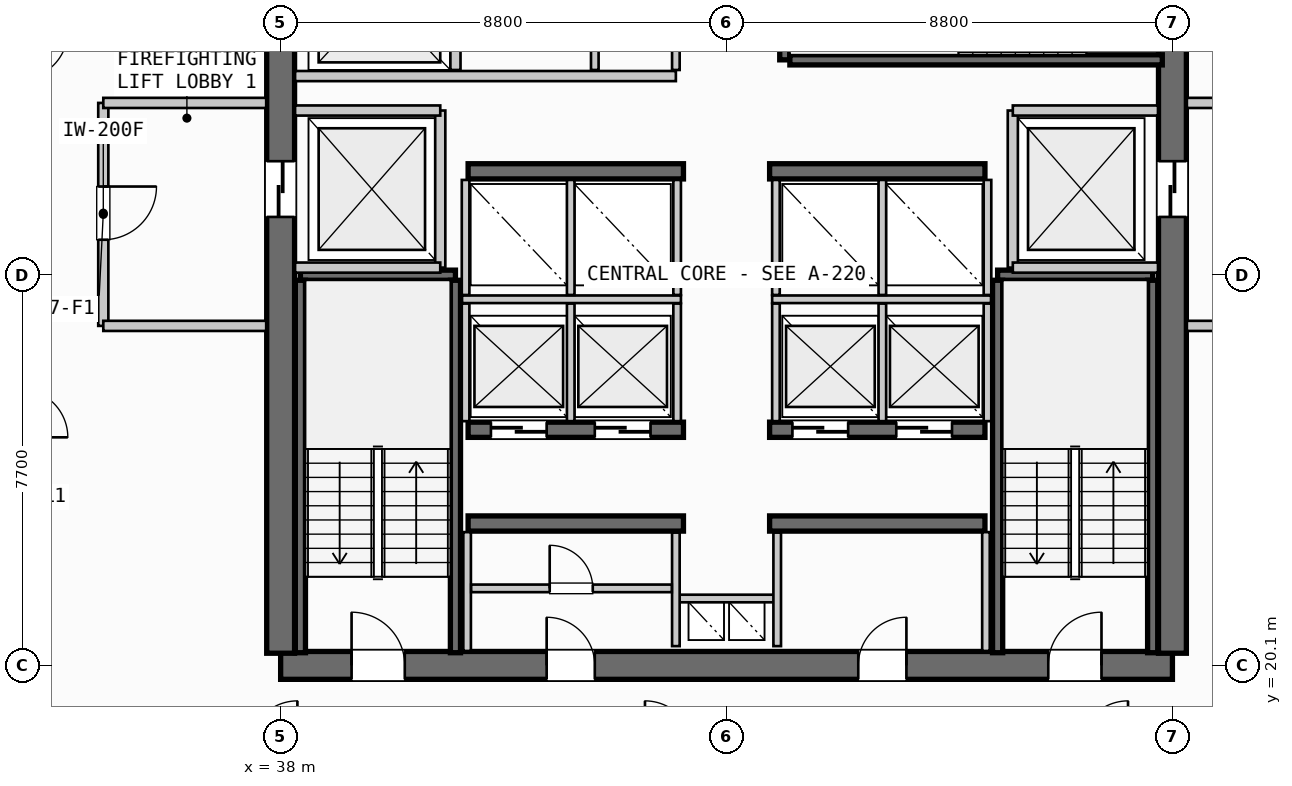
"""IFC4 building model, lengths in metres.
Left out: names, types, materials, properties, quantities, classifications, styles, units other than length and angle.
Written with IfcOpenShell. Run it as: python <this file> out.ifc"""

import sys

from ifc_helpers import new_model, si_unit, direction, frame, frame_2d, origin, place, context, subcontext, project, spatial, rectangle, extrude, source, transform, mapped, element, fill, save


model = new_model("IFC4")
c1 = context("Model", 3, precision=1e-05, world=origin(), true_north=direction((0.0, 1.0)))
c2 = subcontext(c1, "Body", "Model", "MODEL_VIEW")
j1 = project(units=[si_unit("LENGTHUNIT", "METRE"), si_unit("PLANEANGLEUNIT", "RADIAN")], contexts=[c1])
p1 = place(None, origin())
s1 = spatial("IfcSite", under=j1, at=p1, CompositionType="ELEMENT")
p2 = place(p1, origin())
s2 = spatial("IfcBuilding", under=s1, at=p2, CompositionType="ELEMENT")
p3 = place(p2, frame((0.0, 0.0, 146.55)))
s3 = spatial("IfcBuildingStorey", under=s2, at=p3, CompositionType="ELEMENT", Elevation=146.55)
p4 = place(p3, frame((38.0, 20.1, 0.0), z_axis=(0.0, 0.0, 1.0), x_axis=(1.0, 0.0, 0.0)))
e1 = element("IfcWall", 1, at=p4, inside=s3, PredefinedType="SHEAR", context=c2, shape_type="SweptSolid", body=[
    extrude(rectangle(XDim=17.6, YDim=0.55, at=frame_2d((8.8, 0.0))), origin(), (0.0, 0.0, 1.0), 3.3),
])
p5 = place(p4, frame((1.4, 0.0, 0.0)))
e2 = element("IfcOpeningElement", 2, at=p5, cuts=e1, PredefinedType="OPENING", context=c2, shape_type="SweptSolid", body=[
    extrude(rectangle(XDim=1.05, YDim=2.15, at=frame_2d((0.525, 1.075))), frame((0.0, 0.285, 0.0), z_axis=(0.0, -1.0, 0.0), x_axis=(1.0, 0.0, 0.0)), (0.0, 0.0, 1.0), 0.57),
])
p6 = place(p4, frame((15.15, 0.0, 0.0)))
e3 = element("IfcOpeningElement", 3, at=p6, cuts=e1, PredefinedType="OPENING", context=c2, shape_type="SweptSolid", body=[
    extrude(rectangle(XDim=1.05, YDim=2.15, at=frame_2d((0.525, 1.075))), frame((0.0, 0.285, 0.0), z_axis=(0.0, -1.0, 0.0), x_axis=(1.0, 0.0, 0.0)), (0.0, 0.0, 1.0), 0.57),
])
p7 = place(p4, frame((5.25, 0.0, 0.0)))
e4 = element("IfcOpeningElement", 4, at=p7, cuts=e1, PredefinedType="OPENING", context=c2, shape_type="SweptSolid", body=[
    extrude(rectangle(XDim=0.95, YDim=2.15, at=frame_2d((0.475, 1.075))), frame((0.0, 0.285, 0.0), z_axis=(0.0, -1.0, 0.0), x_axis=(1.0, 0.0, 0.0)), (0.0, 0.0, 1.0), 0.57),
])
p8 = place(p4, frame((11.4, 0.0, 0.0)))
e5 = element("IfcOpeningElement", 5, at=p8, cuts=e1, PredefinedType="OPENING", context=c2, shape_type="SweptSolid", body=[
    extrude(rectangle(XDim=0.95, YDim=2.15, at=frame_2d((0.475, 1.075))), frame((0.0, 0.285, 0.0), z_axis=(0.0, -1.0, 0.0), x_axis=(1.0, 0.0, 0.0)), (0.0, 0.0, 1.0), 0.57),
])
p9 = place(p3, frame((38.0, 35.26, 0.0), z_axis=(0.0, 0.0, 1.0), x_axis=(0.0, -1.0, 0.0)))
e6 = element("IfcWall", 6, at=p9, inside=s3, PredefinedType="SHEAR", context=c2, shape_type="SweptSolid", body=[
    extrude(rectangle(XDim=14.92, YDim=0.55, at=frame_2d((7.46, 0.0))), origin(), (0.0, 0.0, 1.0), 3.3),
])
p10 = place(p9, frame((5.21, 0.0, 0.0)))
e7 = element("IfcOpeningElement", 7, at=p10, cuts=e6, PredefinedType="OPENING", context=c2, shape_type="SweptSolid", body=[
    extrude(rectangle(XDim=1.1, YDim=2.2, at=frame_2d((0.55, 1.1))), frame((0.0, 0.285, 0.0), z_axis=(0.0, -1.0, 0.0), x_axis=(1.0, 0.0, 0.0)), (0.0, 0.0, 1.0), 0.57),
])
p11 = place(p3, frame((55.6, 20.34, 0.0), z_axis=(0.0, 0.0, 1.0), x_axis=(0.0, 1.0, 0.0)))
e8 = element("IfcWall", 8, at=p11, inside=s3, PredefinedType="SHEAR", context=c2, shape_type="SweptSolid", body=[
    extrude(rectangle(XDim=14.92, YDim=0.55, at=frame_2d((7.46, 0.0))), origin(), (0.0, 0.0, 1.0), 3.3),
])
p12 = place(p11, frame((12.71, 0.0, 0.0)))
e9 = element("IfcOpeningElement", 9, at=p12, cuts=e8, PredefinedType="OPENING", context=c2, shape_type="SweptSolid", body=[
    extrude(rectangle(XDim=1.05, YDim=2.15, at=frame_2d((0.525, 1.075))), frame((0.0, 0.285, 0.0), z_axis=(0.0, -1.0, 0.0), x_axis=(1.0, 0.0, 0.0)), (0.0, 0.0, 1.0), 0.57),
])
p13 = place(p11, frame((8.61, 0.0, 0.0)))
e10 = element("IfcOpeningElement", 10, at=p13, cuts=e8, PredefinedType="OPENING", context=c2, shape_type="SweptSolid", body=[
    extrude(rectangle(XDim=1.1, YDim=2.2, at=frame_2d((0.55, 1.1))), frame((0.0, 0.285, 0.0), z_axis=(0.0, -1.0, 0.0), x_axis=(1.0, 0.0, 0.0)), (0.0, 0.0, 1.0), 0.57),
])
for number, where, z_axis, x_axis in (
    (11, (41.7, 22.9, 0.0), (0.0, 0.0, 1.0), (1.0, 0.0, 0.0)),
    (12, (47.65, 22.9, 0.0), (0.0, 0.0, 1.0), (1.0, 0.0, 0.0)),
):
    element("IfcWall", number, at=place(p3, frame(where, z_axis=z_axis, x_axis=x_axis)), inside=s3, PredefinedType="SHEAR", context=c2, shape_type="SweptSolid", body=[
        extrude(rectangle(XDim=4.25, YDim=0.3, at=frame_2d((2.125, 0.0))), origin(), (0.0, 0.0, 1.0), 3.3),
    ])
p14 = place(p3, frame((41.7, 24.75, 0.0), z_axis=(0.0, 0.0, 1.0), x_axis=(1.0, 0.0, 0.0)))
e13 = element("IfcWall", 13, at=p14, inside=s3, PredefinedType="SHEAR", context=c2, shape_type="SweptSolid", body=[
    extrude(rectangle(XDim=4.25, YDim=0.3, at=frame_2d((2.125, 0.0))), origin(), (0.0, 0.0, 1.0), 3.3),
])
p15 = place(p14, frame((0.45, 0.0, 0.0)))
e14 = element("IfcOpeningElement", 14, at=p15, cuts=e13, PredefinedType="OPENING", context=c2, shape_type="SweptSolid", body=[
    extrude(rectangle(XDim=1.1, YDim=2.2, at=frame_2d((0.55, 1.1))), frame((0.0, 0.16, 0.0), z_axis=(0.0, -1.0, 0.0), x_axis=(1.0, 0.0, 0.0)), (0.0, 0.0, 1.0), 0.32),
])
p16 = place(p14, frame((2.5, 0.0, 0.0)))
e15 = element("IfcOpeningElement", 15, at=p16, cuts=e13, PredefinedType="OPENING", context=c2, shape_type="SweptSolid", body=[
    extrude(rectangle(XDim=1.1, YDim=2.2, at=frame_2d((0.55, 1.1))), frame((0.0, 0.16, 0.0), z_axis=(0.0, -1.0, 0.0), x_axis=(1.0, 0.0, 0.0)), (0.0, 0.0, 1.0), 0.32),
])
p17 = place(p3, frame((47.65, 24.75, 0.0), z_axis=(0.0, 0.0, 1.0), x_axis=(1.0, 0.0, 0.0)))
e16 = element("IfcWall", 16, at=p17, inside=s3, PredefinedType="SHEAR", context=c2, shape_type="SweptSolid", body=[
    extrude(rectangle(XDim=4.25, YDim=0.3, at=frame_2d((2.125, 0.0))), origin(), (0.0, 0.0, 1.0), 3.3),
])
p18 = place(p17, frame((0.45, 0.0, 0.0)))
e17 = element("IfcOpeningElement", 17, at=p18, cuts=e16, PredefinedType="OPENING", context=c2, shape_type="SweptSolid", body=[
    extrude(rectangle(XDim=1.1, YDim=2.2, at=frame_2d((0.55, 1.1))), frame((0.0, 0.16, 0.0), z_axis=(0.0, -1.0, 0.0), x_axis=(1.0, 0.0, 0.0)), (0.0, 0.0, 1.0), 0.32),
])
p19 = place(p17, frame((2.5, 0.0, 0.0)))
e18 = element("IfcOpeningElement", 18, at=p19, cuts=e16, PredefinedType="OPENING", context=c2, shape_type="SweptSolid", body=[
    extrude(rectangle(XDim=1.1, YDim=2.2, at=frame_2d((0.55, 1.1))), frame((0.0, 0.16, 0.0), z_axis=(0.0, -1.0, 0.0), x_axis=(1.0, 0.0, 0.0)), (0.0, 0.0, 1.0), 0.32),
])
for number, where, z_axis, x_axis in (
    (19, (41.7, 29.85, 0.0), (0.0, 0.0, 1.0), (1.0, 0.0, 0.0)),
    (20, (47.65, 29.85, 0.0), (0.0, 0.0, 1.0), (1.0, 0.0, 0.0)),
):
    element("IfcWall", number, at=place(p3, frame(where, z_axis=z_axis, x_axis=x_axis)), inside=s3, PredefinedType="SHEAR", context=c2, shape_type="SweptSolid", body=[
        extrude(rectangle(XDim=4.25, YDim=0.3, at=frame_2d((2.125, 0.0))), origin(), (0.0, 0.0, 1.0), 3.3),
    ])
p20 = place(p3, frame((38.39, 27.8, 0.0), z_axis=(0.0, 0.0, 1.0), x_axis=(1.0, 0.0, 0.0)))
e21 = element("IfcWall", 21, at=p20, inside=s3, PredefinedType="SHEAR", context=c2, shape_type="SweptSolid", body=[
    extrude(rectangle(XDim=3.06, YDim=0.2, at=frame_2d((1.53, 0.0))), origin(), (0.0, 0.0, 1.0), 3.3),
])
for number, where, z_axis, x_axis in (
    (22, (41.45, 27.7, 0.0), (0.0, 0.0, 1.0), (0.0, -1.0, 0.0)),
    (23, (38.39, 20.35, 0.0), (0.0, 0.0, 1.0), (0.0, 1.0, 0.0)),
):
    element("IfcWall", number, at=place(p3, frame(where, z_axis=z_axis, x_axis=x_axis)), inside=s3, PredefinedType="SHEAR", context=c2, shape_type="SweptSolid", body=[
        extrude(rectangle(XDim=7.35, YDim=0.2, at=frame_2d((3.675, 0.0))), origin(), (0.0, 0.0, 1.0), 3.3),
    ])
p21 = place(p3, frame((52.15, 27.8, 0.0), z_axis=(0.0, 0.0, 1.0), x_axis=(1.0, 0.0, 0.0)))
e24 = element("IfcWall", 24, at=p21, inside=s3, PredefinedType="SHEAR", context=c2, shape_type="SweptSolid", body=[
    extrude(rectangle(XDim=3.06, YDim=0.2, at=frame_2d((1.53, 0.0))), origin(), (0.0, 0.0, 1.0), 3.3),
])
for number, where, z_axis, x_axis in (
    (25, (55.21, 27.7, 0.0), (0.0, 0.0, 1.0), (0.0, -1.0, 0.0)),
    (26, (52.15, 20.35, 0.0), (0.0, 0.0, 1.0), (0.0, 1.0, 0.0)),
):
    element("IfcWall", number, at=place(p3, frame(where, z_axis=z_axis, x_axis=x_axis)), inside=s3, PredefinedType="SHEAR", context=c2, shape_type="SweptSolid", body=[
        extrude(rectangle(XDim=7.35, YDim=0.2, at=frame_2d((3.675, 0.0))), origin(), (0.0, 0.0, 1.0), 3.3),
    ])
p22 = place(p3, frame((47.95, 32.05, 0.0), z_axis=(0.0, 0.0, 1.0), x_axis=(0.0, 1.0, 0.0)))
e27 = element("IfcWall", 27, at=p22, inside=s3, PredefinedType="SHEAR", context=c2, shape_type="SweptSolid", body=[
    extrude(rectangle(XDim=3.06, YDim=0.2, at=frame_2d((1.53, 0.0))), origin(), (0.0, 0.0, 1.0), 3.3),
])
p23 = place(p3, frame((55.4, 32.05, 0.0), z_axis=(0.0, 0.0, 1.0), x_axis=(-1.0, 0.0, 0.0)))
e28 = element("IfcWall", 28, at=p23, inside=s3, PredefinedType="SHEAR", context=c2, shape_type="SweptSolid", body=[
    extrude(rectangle(XDim=7.35, YDim=0.2, at=frame_2d((3.675, 0.0))), origin(), (0.0, 0.0, 1.0), 3.3),
])
p24 = place(p3, frame((45.8, 21.42, 0.0), z_axis=(0.0, 0.0, 1.0), x_axis=(1.0, 0.0, 0.0)))
e29 = element("IfcWall", 29, at=p24, inside=s3, PredefinedType="PARTITIONING", context=c2, shape_type="SweptSolid", body=[
    extrude(rectangle(XDim=2.0, YDim=0.15, at=frame_2d((1.0, 0.0))), origin(), (0.0, 0.0, 1.0), 2.305),
])
for number, where, z_axis, x_axis in (
    (30, (45.8, 20.48, 0.0), (0.0, 0.0, 1.0), (0.0, 1.0, 0.0)),
    (31, (47.8, 20.48, 0.0), (0.0, 0.0, 1.0), (0.0, 1.0, 0.0)),
):
    element("IfcWall", number, at=place(p3, frame(where, z_axis=z_axis, x_axis=x_axis)), inside=s3, PredefinedType="PARTITIONING", context=c2, shape_type="SweptSolid", body=[
        extrude(rectangle(XDim=2.24, YDim=0.15, at=frame_2d((1.12, 0.0))), origin(), (0.0, 0.0, 1.0), 2.305),
    ])
p25 = place(p3, frame((41.15, 27.95, 0.0), z_axis=(0.0, 0.0, 1.0), x_axis=(0.0, 1.0, 0.0)))
e32 = element("IfcWall", 32, at=p25, inside=s3, PredefinedType="PARTITIONING", context=c2, shape_type="SweptSolid", body=[
    extrude(rectangle(XDim=3.1, YDim=0.2, at=frame_2d((1.55, 0.0))), origin(), (0.0, 0.0, 1.0), 2.305),
])
for number, where, z_axis, x_axis in (
    (33, (38.285, 27.95, 0.0), (0.0, 0.0, 1.0), (1.0, 0.0, 0.0)),
    (34, (38.285, 31.05, 0.0), (0.0, 0.0, 1.0), (1.0, 0.0, 0.0)),
):
    element("IfcWall", number, at=place(p3, frame(where, z_axis=z_axis, x_axis=x_axis)), inside=s3, PredefinedType="PARTITIONING", context=c2, shape_type="SweptSolid", body=[
        extrude(rectangle(XDim=2.865, YDim=0.2, at=frame_2d((1.433, 0.0))), origin(), (0.0, 0.0, 1.0), 2.305),
    ])
p26 = place(p3, frame((34.5, 31.2, 0.0), z_axis=(0.0, 0.0, 1.0), x_axis=(0.0, -1.0, 0.0)))
e35 = element("IfcWall", 35, at=p26, inside=s3, PredefinedType="PARTITIONING", context=c2, shape_type="SweptSolid", body=[
    extrude(rectangle(XDim=4.4, YDim=0.2, at=frame_2d((2.2, 0.0))), origin(), (0.0, 0.0, 1.0), 2.305),
])
p27 = place(p26, frame((1.65, 0.0, 0.0)))
e36 = element("IfcOpeningElement", 36, at=p27, cuts=e35, PredefinedType="OPENING", context=c2, shape_type="SweptSolid", body=[
    extrude(rectangle(XDim=1.05, YDim=2.15, at=frame_2d((0.525, 1.075))), frame((0.0, 0.11, 0.0), z_axis=(0.0, -1.0, 0.0), x_axis=(1.0, 0.0, 0.0)), (0.0, 0.0, 1.0), 0.22),
])
for number, where, z_axis, x_axis in (
    (37, (34.5, 26.8, 0.0), (0.0, 0.0, 1.0), (1.0, 0.0, 0.0)),
    (38, (34.5, 31.2, 0.0), (0.0, 0.0, 1.0), (1.0, 0.0, 0.0)),
):
    element("IfcWall", number, at=place(p3, frame(where, z_axis=z_axis, x_axis=x_axis)), inside=s3, PredefinedType="PARTITIONING", context=c2, shape_type="SweptSolid", body=[
        extrude(rectangle(XDim=3.215, YDim=0.2, at=frame_2d((1.607, 0.0))), origin(), (0.0, 0.0, 1.0), 2.305),
    ])
p28 = place(p3, frame((52.45, 27.95, 0.0), z_axis=(0.0, 0.0, 1.0), x_axis=(0.0, 1.0, 0.0)))
e39 = element("IfcWall", 39, at=p28, inside=s3, PredefinedType="PARTITIONING", context=c2, shape_type="SweptSolid", body=[
    extrude(rectangle(XDim=3.1, YDim=0.2, at=frame_2d((1.55, 0.0))), origin(), (0.0, 0.0, 1.0), 2.305),
])
for number, where, z_axis, x_axis in (
    (40, (52.45, 27.95, 0.0), (0.0, 0.0, 1.0), (1.0, 0.0, 0.0)),
    (41, (52.45, 31.05, 0.0), (0.0, 0.0, 1.0), (1.0, 0.0, 0.0)),
):
    element("IfcWall", number, at=place(p3, frame(where, z_axis=z_axis, x_axis=x_axis)), inside=s3, PredefinedType="PARTITIONING", context=c2, shape_type="SweptSolid", body=[
        extrude(rectangle(XDim=2.865, YDim=0.2, at=frame_2d((1.433, 0.0))), origin(), (0.0, 0.0, 1.0), 2.305),
    ])
for number, where, z_axis, x_axis in (
    (42, (55.885, 26.8, 0.0), (0.0, 0.0, 1.0), (1.0, 0.0, 0.0)),
    (43, (55.885, 31.2, 0.0), (0.0, 0.0, 1.0), (1.0, 0.0, 0.0)),
):
    element("IfcWall", number, at=place(p3, frame(where, z_axis=z_axis, x_axis=x_axis)), inside=s3, PredefinedType="PARTITIONING", context=c2, shape_type="SweptSolid", body=[
        extrude(rectangle(XDim=3.215, YDim=0.2, at=frame_2d((1.607, 0.0))), origin(), (0.0, 0.0, 1.0), 2.305),
    ])
for number, where, z_axis, x_axis in (
    (44, (41.68, 20.385, 0.0), (0.0, 0.0, 1.0), (0.0, 1.0, 0.0)),
    (45, (51.92, 20.385, 0.0), (0.0, 0.0, 1.0), (0.0, 1.0, 0.0)),
):
    element("IfcWall", number, at=place(p3, frame(where, z_axis=z_axis, x_axis=x_axis)), inside=s3, PredefinedType="PARTITIONING", context=c2, shape_type="SweptSolid", body=[
        extrude(rectangle(XDim=2.345, YDim=0.15, at=frame_2d((1.172, 0.0))), origin(), (0.0, 0.0, 1.0), 2.305),
    ])
p29 = place(p3, frame((41.76, 21.62, 0.0), z_axis=(0.0, 0.0, 1.0), x_axis=(1.0, 0.0, 0.0)))
e46 = element("IfcWall", 46, at=p29, inside=s3, PredefinedType="PARTITIONING", context=c2, shape_type="SweptSolid", body=[
    extrude(rectangle(XDim=3.96, YDim=0.15, at=frame_2d((1.98, 0.0))), origin(), (0.0, 0.0, 1.0), 2.305),
])
p30 = place(p29, frame((1.55, 0.0, 0.0)))
e47 = element("IfcOpeningElement", 47, at=p30, cuts=e46, PredefinedType="OPENING", context=c2, shape_type="SweptSolid", body=[
    extrude(rectangle(XDim=0.85, YDim=2.15, at=frame_2d((0.425, 1.075))), frame((0.0, 0.085, 0.0), z_axis=(0.0, -1.0, 0.0), x_axis=(1.0, 0.0, 0.0)), (0.0, 0.0, 1.0), 0.17),
])
p31 = place(p3, frame((41.58, 27.325, 0.0), z_axis=(0.0, 0.0, 1.0), x_axis=(1.0, 0.0, 0.0)))
e48 = element("IfcWall", 48, at=p31, inside=s3, PredefinedType="PARTITIONING", context=c2, shape_type="SweptSolid", body=[
    extrude(rectangle(XDim=4.32, YDim=0.15, at=frame_2d((2.16, 0.0))), origin(), (0.0, 0.0, 1.0), 2.305),
])
p32 = place(p3, frame((47.7, 27.325, 0.0), z_axis=(0.0, 0.0, 1.0), x_axis=(1.0, 0.0, 0.0)))
e49 = element("IfcWall", 49, at=p32, inside=s3, PredefinedType="PARTITIONING", context=c2, shape_type="SweptSolid", body=[
    extrude(rectangle(XDim=4.32, YDim=0.15, at=frame_2d((2.16, 0.0))), origin(), (0.0, 0.0, 1.0), 2.305),
])
for number, where, z_axis, x_axis in (
    (50, (41.65, 24.92, 0.0), (0.0, 0.0, 1.0), (0.0, 1.0, 0.0)),
    (51, (43.725, 24.92, 0.0), (0.0, 0.0, 1.0), (0.0, 1.0, 0.0)),
    (52, (45.825, 24.92, 0.0), (0.0, 0.0, 1.0), (0.0, 1.0, 0.0)),
    (53, (47.775, 24.92, 0.0), (0.0, 0.0, 1.0), (0.0, 1.0, 0.0)),
    (54, (49.875, 24.92, 0.0), (0.0, 0.0, 1.0), (0.0, 1.0, 0.0)),
    (55, (51.95, 24.92, 0.0), (0.0, 0.0, 1.0), (0.0, 1.0, 0.0)),
):
    element("IfcWall", number, at=place(p3, frame(where, z_axis=z_axis, x_axis=x_axis)), inside=s3, PredefinedType="PARTITIONING", context=c2, shape_type="SweptSolid", body=[
        extrude(rectangle(XDim=2.32, YDim=0.15, at=frame_2d((1.16, 0.0))), origin(), (0.0, 0.0, 1.0), 2.305),
    ])
for number, where, z_axis, x_axis in (
    (56, (41.65, 27.41, 0.0), (0.0, 0.0, 1.0), (0.0, 1.0, 0.0)),
    (57, (43.725, 27.41, 0.0), (0.0, 0.0, 1.0), (0.0, 1.0, 0.0)),
    (58, (45.825, 27.41, 0.0), (0.0, 0.0, 1.0), (0.0, 1.0, 0.0)),
    (59, (47.775, 27.41, 0.0), (0.0, 0.0, 1.0), (0.0, 1.0, 0.0)),
    (60, (49.875, 27.41, 0.0), (0.0, 0.0, 1.0), (0.0, 1.0, 0.0)),
    (61, (51.95, 27.41, 0.0), (0.0, 0.0, 1.0), (0.0, 1.0, 0.0)),
):
    element("IfcWall", number, at=place(p3, frame(where, z_axis=z_axis, x_axis=x_axis)), inside=s3, PredefinedType="PARTITIONING", context=c2, shape_type="SweptSolid", body=[
        extrude(rectangle(XDim=2.27, YDim=0.15, at=frame_2d((1.135, 0.0))), origin(), (0.0, 0.0, 1.0), 2.305),
    ])
p33 = place(p3, frame((41.45, 31.85, 0.0), z_axis=(0.0, 0.0, 1.0), x_axis=(0.0, 1.0, 0.0)))
e62 = element("IfcWall", 62, at=p33, inside=s3, PredefinedType="PARTITIONING", context=c2, shape_type="SweptSolid", body=[
    extrude(rectangle(XDim=3.365, YDim=0.2, at=frame_2d((1.683, 0.0))), origin(), (0.0, 0.0, 1.0), 2.305),
])
p34 = place(p3, frame((38.285, 31.73, 0.0), z_axis=(0.0, 0.0, 1.0), x_axis=(1.0, 0.0, 0.0)))
e63 = element("IfcWall", 63, at=p34, inside=s3, PredefinedType="PARTITIONING", context=c2, shape_type="SweptSolid", body=[
    extrude(rectangle(XDim=7.515, YDim=0.2, at=frame_2d((3.758, 0.0))), origin(), (0.0, 0.0, 1.0), 2.305),
])
p35 = place(p3, frame((45.8, 31.85, 0.0), z_axis=(0.0, 0.0, 1.0), x_axis=(0.0, 1.0, 0.0)))
e64 = element("IfcWall", 64, at=p35, inside=s3, PredefinedType="PARTITIONING", context=c2, shape_type="SweptSolid", body=[
    extrude(rectangle(XDim=3.365, YDim=0.15, at=frame_2d((1.683, 0.0))), origin(), (0.0, 0.0, 1.0), 2.305),
])
p36 = place(p3, frame((44.2, 31.85, 0.0), z_axis=(0.0, 0.0, 1.0), x_axis=(0.0, 1.0, 0.0)))
e65 = element("IfcWall", 65, at=p36, inside=s3, PredefinedType="PLUMBINGWALL", context=c2, shape_type="SweptSolid", body=[
    extrude(rectangle(XDim=3.365, YDim=0.15, at=frame_2d((1.683, 0.0))), origin(), (0.0, 0.0, 1.0), 2.305),
])
m1 = source(origin(), c2, "Body", "SweptSolid", [
    extrude(rectangle(XDim=1.05, YDim=2.15, at=frame_2d((0.525, 1.075))), frame((0.0, 0.025, 0.0), z_axis=(0.0, -1.0, 0.0), x_axis=(1.0, 0.0, 0.0)), (0.0, 0.0, 1.0), 0.05),
])
p37 = place(p5, origin())
e66 = element("IfcDoor", 66, at=p37, inside=s3, OperationType="SINGLE_SWING_LEFT", PredefinedType="DOOR", context=c2, shape_type="MappedRepresentation", body=[
    mapped(m1, transform((0.0, 0.0, 0.0), scale=1.0)),
])
fill(e2, e66)
p38 = place(p6, origin())
e67 = element("IfcDoor", 67, at=p38, inside=s3, OperationType="SINGLE_SWING_RIGHT", PredefinedType="DOOR", context=c2, shape_type="MappedRepresentation", body=[
    mapped(m1, transform((0.0, 0.0, 0.0), scale=1.0)),
])
fill(e3, e67)
m2 = source(origin(), c2, "Body", "SweptSolid", [
    extrude(rectangle(XDim=1.1, YDim=2.2, at=frame_2d((0.55, 1.1))), frame((0.0, 0.025, 0.0), z_axis=(0.0, -1.0, 0.0), x_axis=(1.0, 0.0, 0.0)), (0.0, 0.0, 1.0), 0.05),
])
p39 = place(p10, origin())
e68 = element("IfcDoor", 68, at=p39, inside=s3, OperationType="SLIDING_TO_LEFT", PredefinedType="DOOR", context=c2, shape_type="MappedRepresentation", body=[
    mapped(m2, transform((0.0, 0.0, 0.0), scale=1.0)),
])
fill(e7, e68)
p40 = place(p13, origin())
e69 = element("IfcDoor", 69, at=p40, inside=s3, OperationType="SLIDING_TO_RIGHT", PredefinedType="DOOR", context=c2, shape_type="MappedRepresentation", body=[
    mapped(m2, transform((0.0, 0.0, 0.0), scale=1.0)),
])
fill(e10, e69)
m3 = source(origin(), c2, "Body", "SweptSolid", [
    extrude(rectangle(XDim=0.95, YDim=2.15, at=frame_2d((0.475, 1.075))), frame((0.0, 0.025, 0.0), z_axis=(0.0, -1.0, 0.0), x_axis=(1.0, 0.0, 0.0)), (0.0, 0.0, 1.0), 0.05),
])
p41 = place(p7, origin())
e70 = element("IfcDoor", 70, at=p41, inside=s3, OperationType="SINGLE_SWING_LEFT", PredefinedType="DOOR", context=c2, shape_type="MappedRepresentation", body=[
    mapped(m3, transform((0.0, 0.0, 0.0), scale=1.0)),
])
fill(e4, e70)
p42 = place(p8, origin())
e71 = element("IfcDoor", 71, at=p42, inside=s3, OperationType="SINGLE_SWING_RIGHT", PredefinedType="DOOR", context=c2, shape_type="MappedRepresentation", body=[
    mapped(m3, transform((0.0, 0.0, 0.0), scale=1.0)),
])
fill(e5, e71)
p43 = place(p15, origin())
e72 = element("IfcDoor", 72, at=p43, inside=s3, OperationType="SLIDING_TO_RIGHT", PredefinedType="DOOR", context=c2, shape_type="MappedRepresentation", body=[
    mapped(m2, transform((0.0, 0.0, 0.0), scale=1.0)),
])
fill(e14, e72)
p44 = place(p16, origin())
e73 = element("IfcDoor", 73, at=p44, inside=s3, OperationType="SLIDING_TO_RIGHT", PredefinedType="DOOR", context=c2, shape_type="MappedRepresentation", body=[
    mapped(m2, transform((0.0, 0.0, 0.0), scale=1.0)),
])
fill(e15, e73)
p45 = place(p18, origin())
e74 = element("IfcDoor", 74, at=p45, inside=s3, OperationType="SLIDING_TO_RIGHT", PredefinedType="DOOR", context=c2, shape_type="MappedRepresentation", body=[
    mapped(m2, transform((0.0, 0.0, 0.0), scale=1.0)),
])
fill(e17, e74)
p46 = place(p19, origin())
e75 = element("IfcDoor", 75, at=p46, inside=s3, OperationType="SLIDING_TO_RIGHT", PredefinedType="DOOR", context=c2, shape_type="MappedRepresentation", body=[
    mapped(m2, transform((0.0, 0.0, 0.0), scale=1.0)),
])
fill(e18, e75)
p47 = place(p27, origin())
e76 = element("IfcDoor", 76, at=p47, inside=s3, OperationType="SINGLE_SWING_LEFT", PredefinedType="DOOR", context=c2, shape_type="MappedRepresentation", body=[
    mapped(m1, transform((0.0, 0.0, 0.0), scale=1.0)),
])
fill(e36, e76)
m4 = source(origin(), c2, "Body", "SweptSolid", [
    extrude(rectangle(XDim=0.85, YDim=2.15, at=frame_2d((0.425, 1.075))), frame((0.0, 0.025, 0.0), z_axis=(0.0, -1.0, 0.0), x_axis=(1.0, 0.0, 0.0)), (0.0, 0.0, 1.0), 0.05),
])
p48 = place(p30, origin())
e77 = element("IfcDoor", 77, at=p48, inside=s3, OperationType="SINGLE_SWING_LEFT", PredefinedType="DOOR", context=c2, shape_type="MappedRepresentation", body=[
    mapped(m4, transform((0.0, 0.0, 0.0), scale=1.0)),
])
fill(e47, e77)
save(model, sys.argv[1])
